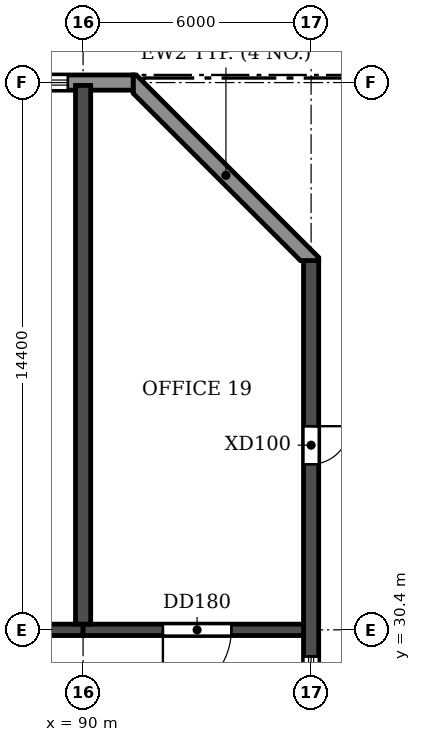
"""IFC4 building model, lengths in metres.
Left out: names, types, materials, properties, quantities, classifications, styles, units other than length and angle.
Written with IfcOpenShell. Run it as: python <this file> out.ifc"""

import sys

from ifc_helpers import new_model, si_unit, direction, frame, frame_2d, origin, place, context, subcontext, project, spatial, polyline, rectangle, outline, extrude, element, fill, save


model = new_model("IFC4")
c1 = context("Model", 3, precision=1e-05, world=origin(), true_north=direction((0.0, 1.0)))
c2 = subcontext(c1, "Body", "Model", "MODEL_VIEW")
j1 = project(units=[si_unit("LENGTHUNIT", "METRE"), si_unit("PLANEANGLEUNIT", "RADIAN")], contexts=[c1])
p1 = place(None, origin())
s1 = spatial("IfcSite", under=j1, at=p1, CompositionType="ELEMENT")
p2 = place(p1, origin())
s2 = spatial("IfcBuilding", under=s1, at=p2, CompositionType="ELEMENT")
p3 = place(p2, frame((0.0, 0.0, 53.1)))
s3 = spatial("IfcBuildingStorey", under=s2, at=p3, CompositionType="ELEMENT", Elevation=53.1)
p4 = place(p3, frame((90.0, 30.55, 0.0), z_axis=(0.0, 0.0, 1.0), x_axis=(0.0, 1.0, 0.0)))
e1 = element("IfcWall", 1, at=p4, inside=s3, PredefinedType="SHEAR", context=c2, shape_type="SweptSolid", body=[
    extrude(rectangle(XDim=14.175, YDim=0.4, at=frame_2d((7.087, 0.0))), origin(), (0.0, 0.0, 1.0), 3.05),
])
p5 = place(p3, frame((96.0, 4.683, 0.0), z_axis=(0.0, 0.0, 1.0), x_axis=(0.0, 1.0, 0.0)))
e2 = element("IfcWall", 2, at=p5, inside=s3, PredefinedType="SHEAR", context=c2, shape_type="SweptSolid", body=[
    extrude(rectangle(XDim=35.434, YDim=0.4, at=frame_2d((17.717, 0.0))), origin(), (0.0, 0.0, 1.0), 3.05),
])
p6 = place(p5, frame((15.917, 0.0, 0.9)))
e3 = element("IfcOpeningElement", 3, at=p6, cuts=e2, PredefinedType="OPENING", context=c2, shape_type="SweptSolid", body=[
    extrude(rectangle(XDim=1.2, YDim=1.5, at=frame_2d((0.6, 0.75))), frame((0.0, 0.21, 0.0), z_axis=(0.0, -1.0, 0.0), x_axis=(1.0, 0.0, 0.0)), (0.0, 0.0, 1.0), 0.42),
])
p7 = place(p5, frame((23.817, 0.0, 0.9)))
e4 = element("IfcOpeningElement", 4, at=p7, cuts=e2, PredefinedType="OPENING", context=c2, shape_type="SweptSolid", body=[
    extrude(rectangle(XDim=1.2, YDim=1.5, at=frame_2d((0.6, 0.75))), frame((0.0, 0.21, 0.0), z_axis=(0.0, -1.0, 0.0), x_axis=(1.0, 0.0, 0.0)), (0.0, 0.0, 1.0), 0.42),
])
p8 = place(p5, frame((8.017, 0.0, 0.9)))
e5 = element("IfcOpeningElement", 5, at=p8, cuts=e2, PredefinedType="OPENING", context=c2, shape_type="SweptSolid", body=[
    extrude(rectangle(XDim=1.2, YDim=1.5, at=frame_2d((0.6, 0.75))), frame((0.0, 0.21, 0.0), z_axis=(0.0, -1.0, 0.0), x_axis=(1.0, 0.0, 0.0)), (0.0, 0.0, 1.0), 0.42),
])
p9 = place(p5, frame((30.076, 0.0, 0.0)))
e6 = element("IfcOpeningElement", 6, at=p9, cuts=e2, PredefinedType="OPENING", context=c2, shape_type="SweptSolid", body=[
    extrude(rectangle(XDim=1.0, YDim=2.1, at=frame_2d((0.5, 1.05))), frame((0.0, 0.21, 0.0), z_axis=(0.0, -1.0, 0.0), x_axis=(1.0, 0.0, 0.0)), (0.0, 0.0, 1.0), 0.42),
])
p10 = place(p5, frame((3.159, 0.0, 0.0)))
e7 = element("IfcOpeningElement", 7, at=p10, cuts=e2, PredefinedType="OPENING", context=c2, shape_type="SweptSolid", body=[
    extrude(rectangle(XDim=1.0, YDim=2.1, at=frame_2d((0.5, 1.05))), frame((0.0, 0.21, 0.0), z_axis=(0.0, -1.0, 0.0), x_axis=(1.0, 0.0, 0.0)), (0.0, 0.0, 1.0), 0.42),
])
p11 = place(p3, frame((84.0, 30.4, 0.0), z_axis=(0.0, 0.0, 1.0), x_axis=(1.0, 0.0, 0.0)))
e8 = element("IfcWall", 8, at=p11, inside=s3, PredefinedType="SHEAR", context=c2, shape_type="SweptSolid", body=[
    extrude(rectangle(XDim=6.0, YDim=0.3, at=frame_2d((3.0, 0.0))), origin(), (0.0, 0.0, 1.0), 2.45),
])
p12 = place(p11, frame((2.1, 0.0, 0.0)))
e9 = element("IfcOpeningElement", 9, at=p12, cuts=e8, PredefinedType="OPENING", context=c2, shape_type="SweptSolid", body=[
    extrude(rectangle(XDim=1.8, YDim=2.1, at=frame_2d((0.9, 1.05))), frame((0.0, 0.16, 0.0), z_axis=(0.0, -1.0, 0.0), x_axis=(1.0, 0.0, 0.0)), (0.0, 0.0, 1.0), 0.32),
])
p13 = place(p3, frame((90.0, 30.4, 0.0), z_axis=(0.0, 0.0, 1.0), x_axis=(1.0, 0.0, 0.0)))
e10 = element("IfcWall", 10, at=p13, inside=s3, PredefinedType="SHEAR", context=c2, shape_type="SweptSolid", body=[
    extrude(rectangle(XDim=5.8, YDim=0.3, at=frame_2d((2.9, 0.0))), origin(), (0.0, 0.0, 1.0), 2.45),
])
p14 = place(p13, frame((2.1, 0.0, 0.0)))
e11 = element("IfcOpeningElement", 11, at=p14, cuts=e10, PredefinedType="OPENING", context=c2, shape_type="SweptSolid", body=[
    extrude(rectangle(XDim=1.8, YDim=2.1, at=frame_2d((0.9, 1.05))), frame((0.0, 0.16, 0.0), z_axis=(0.0, -1.0, 0.0), x_axis=(1.0, 0.0, 0.0)), (0.0, 0.0, 1.0), 0.32),
])
p15 = place(p3, origin())
e12 = element("IfcWall", 12, at=p15, inside=s3, PredefinedType="STANDARD", context=c2, shape_type="SweptSolid", body=[
    extrude(outline(polyline([(96.2, 40.117), (96.2, 40.2), (91.4, 45.0), (91.317, 45.0), (91.317, 44.517), (95.717, 40.117), (96.2, 40.117)])), origin(), (0.0, 0.0, 1.0), 3.05),
])
p16 = place(p3, frame((91.317, 44.8, 0.0), z_axis=(0.0, 0.0, 1.0), x_axis=(-1.0, 0.0, 0.0)))
e13 = element("IfcWall", 13, at=p16, inside=s3, PredefinedType="STANDARD", context=c2, shape_type="SweptSolid", body=[
    extrude(rectangle(XDim=25.317, YDim=0.4, at=frame_2d((12.659, 0.0))), origin(), (0.0, 0.0, 1.0), 3.05),
])
p17 = place(p16, frame((16.717, 0.0, 0.6)))
e14 = element("IfcOpeningElement", 14, at=p17, cuts=e13, PredefinedType="OPENING", context=c2, shape_type="SweptSolid", body=[
    extrude(rectangle(XDim=2.2, YDim=1.8, at=frame_2d((1.1, 0.9))), frame((0.0, 0.21, 0.0), z_axis=(0.0, -1.0, 0.0), x_axis=(1.0, 0.0, 0.0)), (0.0, 0.0, 1.0), 0.42),
])
p18 = place(p16, frame((13.717, 0.0, 0.6)))
e15 = element("IfcOpeningElement", 15, at=p18, cuts=e13, PredefinedType="OPENING", context=c2, shape_type="SweptSolid", body=[
    extrude(rectangle(XDim=2.2, YDim=1.8, at=frame_2d((1.1, 0.9))), frame((0.0, 0.21, 0.0), z_axis=(0.0, -1.0, 0.0), x_axis=(1.0, 0.0, 0.0)), (0.0, 0.0, 1.0), 0.42),
])
p19 = place(p16, frame((10.717, 0.0, 0.6)))
e16 = element("IfcOpeningElement", 16, at=p19, cuts=e13, PredefinedType="OPENING", context=c2, shape_type="SweptSolid", body=[
    extrude(rectangle(XDim=2.2, YDim=1.8, at=frame_2d((1.1, 0.9))), frame((0.0, 0.21, 0.0), z_axis=(0.0, -1.0, 0.0), x_axis=(1.0, 0.0, 0.0)), (0.0, 0.0, 1.0), 0.42),
])
p20 = place(p16, frame((7.717, 0.0, 0.6)))
e17 = element("IfcOpeningElement", 17, at=p20, cuts=e13, PredefinedType="OPENING", context=c2, shape_type="SweptSolid", body=[
    extrude(rectangle(XDim=2.2, YDim=1.8, at=frame_2d((1.1, 0.9))), frame((0.0, 0.21, 0.0), z_axis=(0.0, -1.0, 0.0), x_axis=(1.0, 0.0, 0.0)), (0.0, 0.0, 1.0), 0.42),
])
p21 = place(p16, frame((4.717, 0.0, 0.6)))
e18 = element("IfcOpeningElement", 18, at=p21, cuts=e13, PredefinedType="OPENING", context=c2, shape_type="SweptSolid", body=[
    extrude(rectangle(XDim=2.2, YDim=1.8, at=frame_2d((1.1, 0.9))), frame((0.0, 0.21, 0.0), z_axis=(0.0, -1.0, 0.0), x_axis=(1.0, 0.0, 0.0)), (0.0, 0.0, 1.0), 0.42),
])
p22 = place(p16, frame((1.717, 0.0, 0.6)))
e19 = element("IfcOpeningElement", 19, at=p22, cuts=e13, PredefinedType="OPENING", context=c2, shape_type="SweptSolid", body=[
    extrude(rectangle(XDim=2.2, YDim=1.8, at=frame_2d((1.1, 0.9))), frame((0.0, 0.21, 0.0), z_axis=(0.0, -1.0, 0.0), x_axis=(1.0, 0.0, 0.0)), (0.0, 0.0, 1.0), 0.42),
])
p23 = place(p7, origin())
e20 = element("IfcWindow", 20, at=p23, inside=s3, PartitioningType="SINGLE_PANEL", PredefinedType="WINDOW", context=c2, shape_type="SweptSolid", body=[
    extrude(rectangle(XDim=1.2, YDim=1.5, at=frame_2d((0.6, 0.75))), frame((0.0, 0.03, 0.0), z_axis=(0.0, -1.0, 0.0), x_axis=(1.0, 0.0, 0.0)), (0.0, 0.0, 1.0), 0.06),
])
fill(e4, e20)
p24 = place(p22, origin())
e21 = element("IfcWindow", 21, at=p24, inside=s3, PartitioningType="DOUBLE_PANEL_HORIZONTAL", PredefinedType="WINDOW", context=c2, shape_type="SweptSolid", body=[
    extrude(rectangle(XDim=2.2, YDim=1.8, at=frame_2d((1.1, 0.9))), frame((0.0, 0.03, 0.0), z_axis=(0.0, -1.0, 0.0), x_axis=(1.0, 0.0, 0.0)), (0.0, 0.0, 1.0), 0.06),
])
fill(e19, e21)
p25 = place(p14, frame((1.8, 0.0, 0.0), z_axis=(0.0, 0.0, 1.0), x_axis=(-1.0, 0.0, 0.0)))
e22 = element("IfcDoor", 22, at=p25, inside=s3, OperationType="DOUBLE_DOOR_SINGLE_SWING", PredefinedType="DOOR", context=c2, shape_type="SweptSolid", body=[
    extrude(rectangle(XDim=1.8, YDim=2.1, at=frame_2d((0.9, 1.05))), frame((0.0, 0.025, 0.0), z_axis=(0.0, -1.0, 0.0), x_axis=(1.0, 0.0, 0.0)), (0.0, 0.0, 1.0), 0.05),
])
fill(e11, e22)
p26 = place(p9, frame((1.0, 0.0, 0.0), z_axis=(0.0, 0.0, 1.0), x_axis=(-1.0, 0.0, 0.0)))
e23 = element("IfcDoor", 23, at=p26, inside=s3, OperationType="SINGLE_SWING_LEFT", PredefinedType="DOOR", context=c2, shape_type="SweptSolid", body=[
    extrude(rectangle(XDim=1.0, YDim=2.1, at=frame_2d((0.5, 1.05))), frame((0.0, 0.025, 0.0), z_axis=(0.0, -1.0, 0.0), x_axis=(1.0, 0.0, 0.0)), (0.0, 0.0, 1.0), 0.05),
])
fill(e6, e23)
save(model, sys.argv[1])
